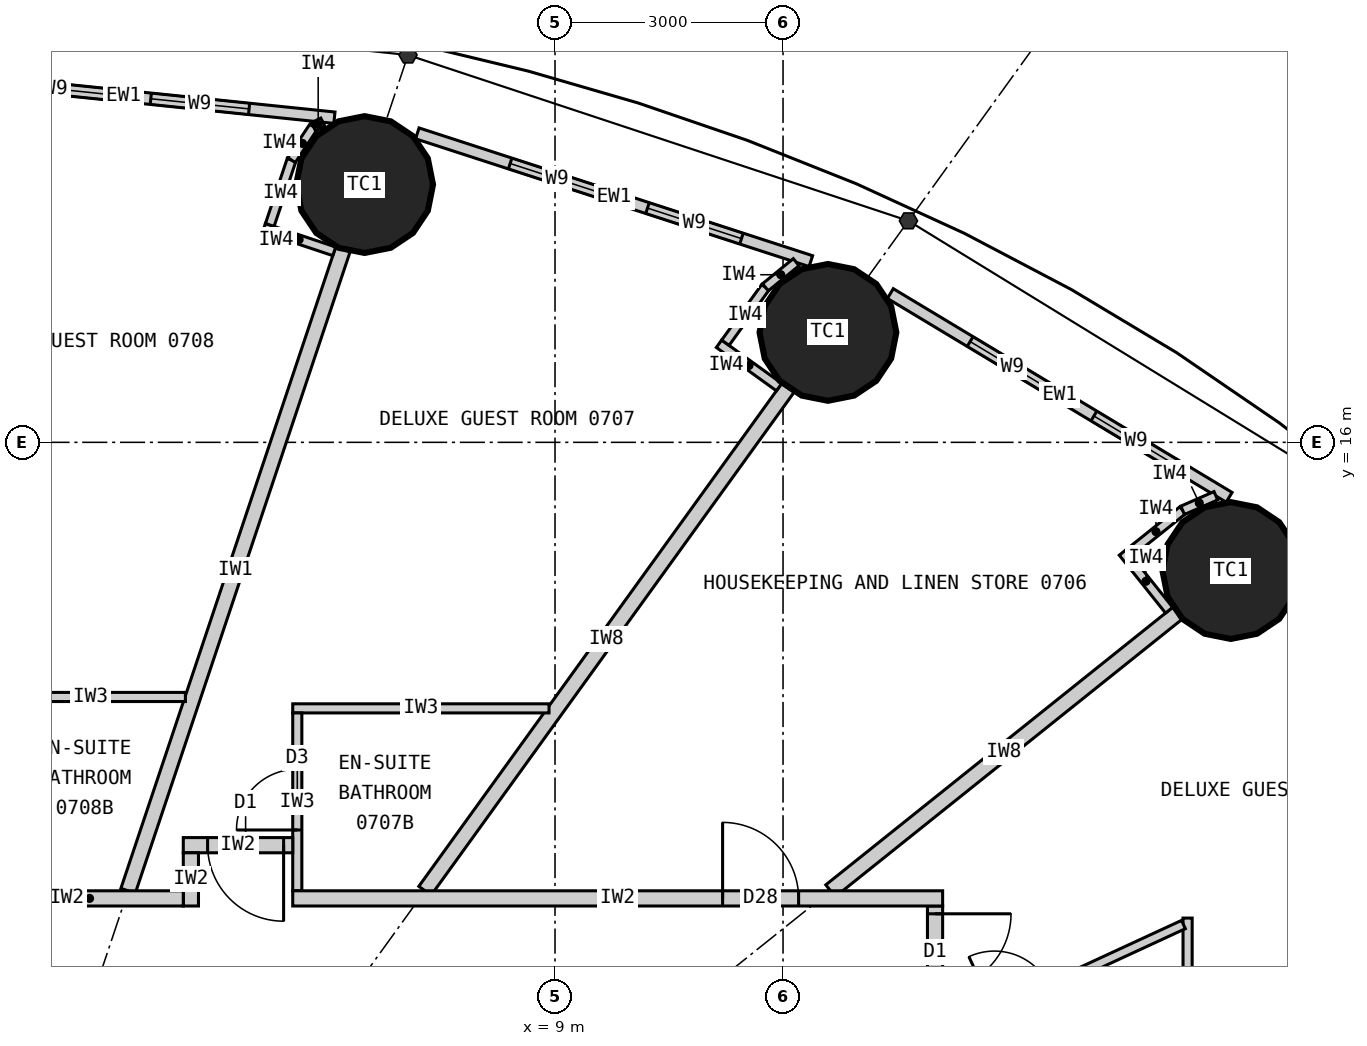
"""IFC4 building model, lengths in metres.
Left out: names, types, materials, properties, quantities, classifications, styles, units other than length and angle.
Written with IfcOpenShell. Run it as: python <this file> out.ifc"""

import sys

from ifc_helpers import new_model, si_unit, direction, frame, frame_2d, origin, origin_2d, place, context, subcontext, project, spatial, rectangle, circle, extrude, element, fill, save


model = new_model("IFC4")
c1 = context("Model", 3, precision=1e-05, world=origin(), true_north=direction((0.0, 1.0)))
c2 = subcontext(c1, "Body", "Model", "MODEL_VIEW")
j1 = project(units=[si_unit("LENGTHUNIT", "METRE"), si_unit("PLANEANGLEUNIT", "RADIAN")], contexts=[c1])
p1 = place(None, origin())
s1 = spatial("IfcSite", under=j1, at=p1, CompositionType="ELEMENT")
p2 = place(p1, origin())
s2 = spatial("IfcBuilding", under=s1, at=p2, CompositionType="ELEMENT")
p3 = place(p2, frame((0.0, 0.0, 36.0)))
s3 = spatial("IfcBuildingStorey", under=s2, at=p3, CompositionType="ELEMENT", Elevation=36.0)
for number, where, z_axis, x_axis in (
    (1, (17.892, 14.313, 0.0), (0.0, 0.0, 1.0), (1.0, 0.0, 0.0)),
    (2, (12.591, 17.447, 0.0), (0.0, 0.0, 1.0), (1.0, 0.0, 0.0)),
    (3, (6.495, 19.391, 0.0), (0.0, 0.0, 1.0), (1.0, 0.0, 0.0)),
):
    element("IfcColumn", number, at=place(p3, frame(where, z_axis=z_axis, x_axis=x_axis)), inside=s3, PredefinedType="COLUMN", context=c2, shape_type="SweptSolid", body=[
        extrude(circle(Radius=0.9, at=origin_2d()), origin(), (0.0, 0.0, 1.0), 3.3),
    ])
p4 = place(p3, frame((17.869, 15.277, 0.0), z_axis=(0.0, 0.0, 1.0), x_axis=(-0.856958191554, 0.515385931054, 0.0)))
e4 = element("IfcWall", 4, at=p4, inside=s3, PredefinedType="ELEMENTEDWALL", context=c2, shape_type="SweptSolid", body=[
    extrude(rectangle(XDim=5.201, YDim=0.15, at=frame_2d((2.601, 0.0))), origin(), (0.0, 0.0, 1.0), 3.12),
])
p5 = place(p4, frame((0.776, 0.0, 0.9)))
e5 = element("IfcOpeningElement", 5, at=p5, cuts=e4, PredefinedType="OPENING", context=c2, shape_type="SweptSolid", body=[
    extrude(rectangle(XDim=1.3, YDim=1.9, at=frame_2d((0.65, 0.95))), frame((0.0, 0.085, 0.0), z_axis=(0.0, -1.0, 0.0), x_axis=(1.0, 0.0, 0.0)), (0.0, 0.0, 1.0), 0.17),
])
p6 = place(p4, frame((2.676, 0.0, 0.9)))
e6 = element("IfcOpeningElement", 6, at=p6, cuts=e4, PredefinedType="OPENING", context=c2, shape_type="SweptSolid", body=[
    extrude(rectangle(XDim=1.3, YDim=1.9, at=frame_2d((0.65, 0.95))), frame((0.0, 0.085, 0.0), z_axis=(0.0, -1.0, 0.0), x_axis=(1.0, 0.0, 0.0)), (0.0, 0.0, 1.0), 0.17),
])
p7 = place(p3, frame((12.366, 18.384, 0.0), z_axis=(0.0, 0.0, 1.0), x_axis=(-0.951138486029, 0.308764603532, 0.0)))
e7 = element("IfcWall", 7, at=p7, inside=s3, PredefinedType="ELEMENTEDWALL", context=c2, shape_type="SweptSolid", body=[
    extrude(rectangle(XDim=5.444, YDim=0.15, at=frame_2d((2.722, 0.0))), origin(), (0.0, 0.0, 1.0), 3.12),
])
p8 = place(p7, frame((0.96, 0.0, 0.9)))
e8 = element("IfcOpeningElement", 8, at=p8, cuts=e7, PredefinedType="OPENING", context=c2, shape_type="SweptSolid", body=[
    extrude(rectangle(XDim=1.3, YDim=1.9, at=frame_2d((0.65, 0.95))), frame((0.0, 0.085, 0.0), z_axis=(0.0, -1.0, 0.0), x_axis=(1.0, 0.0, 0.0)), (0.0, 0.0, 1.0), 0.17),
])
p9 = place(p7, frame((2.86, 0.0, 0.9)))
e9 = element("IfcOpeningElement", 9, at=p9, cuts=e7, PredefinedType="OPENING", context=c2, shape_type="SweptSolid", body=[
    extrude(rectangle(XDim=1.3, YDim=1.9, at=frame_2d((0.65, 0.95))), frame((0.0, 0.085, 0.0), z_axis=(0.0, -1.0, 0.0), x_axis=(1.0, 0.0, 0.0)), (0.0, 0.0, 1.0), 0.17),
])
p10 = place(p3, frame((6.098, 20.271, 0.0), z_axis=(0.0, 0.0, 1.0), x_axis=(-0.994723735084, 0.102589915983, 0.0)))
e10 = element("IfcWall", 10, at=p10, inside=s3, PredefinedType="ELEMENTEDWALL", context=c2, shape_type="SweptSolid", body=[
    extrude(rectangle(XDim=5.576, YDim=0.15, at=frame_2d((2.788, 0.0))), origin(), (0.0, 0.0, 1.0), 3.12),
])
p11 = place(p10, frame((1.129, 0.0, 0.9)))
e11 = element("IfcOpeningElement", 11, at=p11, cuts=e10, PredefinedType="OPENING", context=c2, shape_type="SweptSolid", body=[
    extrude(rectangle(XDim=1.3, YDim=1.9, at=frame_2d((0.65, 0.95))), frame((0.0, 0.085, 0.0), z_axis=(0.0, -1.0, 0.0), x_axis=(1.0, 0.0, 0.0)), (0.0, 0.0, 1.0), 0.17),
])
p12 = place(p10, frame((3.029, 0.0, 0.9)))
e12 = element("IfcOpeningElement", 12, at=p12, cuts=e10, PredefinedType="OPENING", context=c2, shape_type="SweptSolid", body=[
    extrude(rectangle(XDim=1.3, YDim=1.9, at=frame_2d((0.65, 0.95))), frame((0.0, 0.085, 0.0), z_axis=(0.0, -1.0, 0.0), x_axis=(1.0, 0.0, 0.0)), (0.0, 0.0, 1.0), 0.17),
])
p13 = place(p3, frame((14.1, 6.512, 0.0), z_axis=(0.0, 0.0, 1.0), x_axis=(0.907842433118, 0.41931147925, 0.0)))
e13 = element("IfcWall", 13, at=p13, inside=s3, PredefinedType="PARTITIONING", context=c2, shape_type="SweptSolid", body=[
    extrude(rectangle(XDim=7.823, YDim=0.2, at=frame_2d((3.912, 0.0))), origin(), (0.0, 0.0, 1.0), 2.32),
])
p14 = place(p3, frame((12.625, 10.1, 0.0), z_axis=(0.0, 0.0, 1.0), x_axis=(0.780872884676, 0.624689953479, 0.0)))
e14 = element("IfcWall", 14, at=p14, inside=s3, PredefinedType="PARTITIONING", context=c2, shape_type="SweptSolid", body=[
    extrude(rectangle(XDim=5.845, YDim=0.2, at=frame_2d((2.922, 0.0))), origin(), (0.0, 0.0, 1.0), 2.32),
])
p15 = place(p3, frame((7.289, 10.1, 0.0), z_axis=(0.0, 0.0, 1.0), x_axis=(0.585216319319, 0.810877216108, 0.0)))
e15 = element("IfcWall", 15, at=p15, inside=s3, PredefinedType="PARTITIONING", context=c2, shape_type="SweptSolid", body=[
    extrude(rectangle(XDim=8.16, YDim=0.2, at=frame_2d((4.08, 0.0))), origin(), (0.0, 0.0, 1.0), 2.32),
])
p16 = place(p3, frame((3.383, 10.1, 0.0), z_axis=(0.0, 0.0, 1.0), x_axis=(0.317593727596, 0.948226884344, 0.0)))
e16 = element("IfcWall", 16, at=p16, inside=s3, PredefinedType="PARTITIONING", context=c2, shape_type="SweptSolid", body=[
    extrude(rectangle(XDim=8.899, YDim=0.2, at=frame_2d((4.449, 0.0))), origin(), (0.0, 0.0, 1.0), 2.32),
])
p17 = place(p3, frame((17.323, 8.101, 0.0), z_axis=(0.0, 0.0, 1.0), x_axis=(0.0, 1.0, 0.0)))
e17 = element("IfcWall", 17, at=p17, inside=s3, PredefinedType="PARTITIONING", context=c2, shape_type="SweptSolid", body=[
    extrude(rectangle(XDim=1.64, YDim=0.12, at=frame_2d((0.82, 0.0))), origin(), (0.0, 0.0, 1.0), 3.12),
])
p18 = place(p3, frame((14.1, 8.193, 0.0), z_axis=(0.0, 0.0, 1.0), x_axis=(0.907836493557, 0.419324338628, 0.0)))
e18 = element("IfcWall", 18, at=p18, inside=s3, PredefinedType="PARTITIONING", context=c2, shape_type="SweptSolid", body=[
    extrude(rectangle(XDim=3.49, YDim=0.12, at=frame_2d((1.745, 0.0))), origin(), (0.0, 0.0, 1.0), 3.12),
])
p19 = place(p18, frame((0.75, 0.0, 0.0)))
e19 = element("IfcOpeningElement", 19, at=p19, cuts=e18, PredefinedType="OPENING", context=c2, shape_type="SweptSolid", body=[
    extrude(rectangle(XDim=0.8, YDim=2.1, at=frame_2d((0.4, 1.05))), frame((0.0, 0.07, 0.0), z_axis=(0.0, -1.0, 0.0), x_axis=(1.0, 0.0, 0.0)), (0.0, 0.0, 1.0), 0.14),
])
p20 = place(p3, frame((8.921, 12.5, 0.0), z_axis=(0.0, 0.0, 1.0), x_axis=(-1.0, 0.0, 0.0)))
e20 = element("IfcWall", 20, at=p20, inside=s3, PredefinedType="PARTITIONING", context=c2, shape_type="SweptSolid", body=[
    extrude(rectangle(XDim=3.372, YDim=0.12, at=frame_2d((1.686, 0.0))), origin(), (0.0, 0.0, 1.0), 3.12),
])
p21 = place(p3, frame((5.609, 10.1, 0.0), z_axis=(0.0, 0.0, 1.0), x_axis=(0.0, 1.0, 0.0)))
e21 = element("IfcWall", 21, at=p21, inside=s3, PredefinedType="PARTITIONING", context=c2, shape_type="SweptSolid", body=[
    extrude(rectangle(XDim=2.34, YDim=0.12, at=frame_2d((1.17, 0.0))), origin(), (0.0, 0.0, 1.0), 3.12),
])
p22 = place(p21, frame((0.8, 0.0, 0.0)))
e22 = element("IfcOpeningElement", 22, at=p22, cuts=e21, PredefinedType="OPENING", context=c2, shape_type="SweptSolid", body=[
    extrude(rectangle(XDim=0.8, YDim=2.1, at=frame_2d((0.4, 1.05))), frame((0.0, 0.07, 0.0), z_axis=(0.0, -1.0, 0.0), x_axis=(1.0, 0.0, 0.0)), (0.0, 0.0, 1.0), 0.14),
])
p23 = place(p3, frame((4.137, 12.65, 0.0), z_axis=(0.0, 0.0, 1.0), x_axis=(-1.0, 0.0, 0.0)))
e23 = element("IfcWall", 23, at=p23, inside=s3, PredefinedType="PARTITIONING", context=c2, shape_type="SweptSolid", body=[
    extrude(rectangle(XDim=2.494, YDim=0.12, at=frame_2d((1.247, 0.0))), origin(), (0.0, 0.0, 1.0), 3.12),
])
p24 = place(p3, frame((4.109, 10.7, 0.0), z_axis=(0.0, 0.0, 1.0), x_axis=(1.0, 0.0, 0.0)))
e24 = element("IfcWall", 24, at=p24, inside=s3, PredefinedType="PARTITIONING", context=c2, shape_type="SweptSolid", body=[
    extrude(rectangle(XDim=1.44, YDim=0.2, at=frame_2d((0.72, 0.0))), origin(), (0.0, 0.0, 1.0), 3.12),
])
p25 = place(p24, frame((0.32, 0.0, 0.0)))
e25 = element("IfcOpeningElement", 25, at=p25, cuts=e24, PredefinedType="OPENING", context=c2, shape_type="SweptSolid", body=[
    extrude(rectangle(XDim=1.0, YDim=2.2, at=frame_2d((0.5, 1.1))), frame((0.0, 0.11, 0.0), z_axis=(0.0, -1.0, 0.0), x_axis=(1.0, 0.0, 0.0)), (0.0, 0.0, 1.0), 0.22),
])
p26 = place(p3, frame((4.209, 9.9, 0.0), z_axis=(0.0, 0.0, 1.0), x_axis=(0.0, 1.0, 0.0)))
e26 = element("IfcWall", 26, at=p26, inside=s3, PredefinedType="PARTITIONING", context=c2, shape_type="SweptSolid", body=[
    extrude(rectangle(XDim=0.7, YDim=0.2, at=frame_2d((0.35, 0.0))), origin(), (0.0, 0.0, 1.0), 3.12),
])
p27 = place(p3, frame((14.0, 4.772, 0.0), z_axis=(0.0, 0.0, 1.0), x_axis=(0.0, 1.0, 0.0)))
e27 = element("IfcWall", 27, at=p27, inside=s3, PredefinedType="PARTITIONING", context=c2, shape_type="SweptSolid", body=[
    extrude(rectangle(XDim=5.127, YDim=0.2, at=frame_2d((2.564, 0.0))), origin(), (0.0, 0.0, 1.0), 3.12),
])
p28 = place(p27, frame((4.025, 0.0, 0.0)))
e28 = element("IfcOpeningElement", 28, at=p28, cuts=e27, PredefinedType="OPENING", context=c2, shape_type="SweptSolid", body=[
    extrude(rectangle(XDim=1.0, YDim=2.2, at=frame_2d((0.5, 1.1))), frame((0.0, 0.11, 0.0), z_axis=(0.0, -1.0, 0.0), x_axis=(1.0, 0.0, 0.0)), (0.0, 0.0, 1.0), 0.22),
])
p29 = place(p3, frame((1.643, 10.0, 0.0), z_axis=(0.0, 0.0, 1.0), x_axis=(1.0, 0.0, 0.0)))
e29 = element("IfcWall", 29, at=p29, inside=s3, PredefinedType="PARTITIONING", context=c2, shape_type="SweptSolid", body=[
    extrude(rectangle(XDim=2.466, YDim=0.2, at=frame_2d((1.233, 0.0))), origin(), (0.0, 0.0, 1.0), 3.12),
])
p30 = place(p3, frame((5.549, 10.0, 0.0), z_axis=(0.0, 0.0, 1.0), x_axis=(1.0, 0.0, 0.0)))
e30 = element("IfcWall", 30, at=p30, inside=s3, PredefinedType="PARTITIONING", context=c2, shape_type="SweptSolid", body=[
    extrude(rectangle(XDim=8.551, YDim=0.2, at=frame_2d((4.275, 0.0))), origin(), (0.0, 0.0, 1.0), 3.12),
])
p31 = place(p30, frame((5.656, 0.0, 0.0)))
e31 = element("IfcOpeningElement", 31, at=p31, cuts=e30, PredefinedType="OPENING", context=c2, shape_type="SweptSolid", body=[
    extrude(rectangle(XDim=1.0, YDim=2.2, at=frame_2d((0.5, 1.1))), frame((0.0, 0.11, 0.0), z_axis=(0.0, -1.0, 0.0), x_axis=(1.0, 0.0, 0.0)), (0.0, 0.0, 1.0), 0.22),
])
p32 = place(p3, frame((17.08, 13.792, 0.0), z_axis=(0.0, 0.0, 1.0), x_axis=(-0.624756144097, 0.780819928289, 0.0)))
e32 = element("IfcWall", 32, at=p32, inside=s3, PredefinedType="PARTITIONING", context=c2, shape_type="SweptSolid", body=[
    extrude(rectangle(XDim=0.975, YDim=0.12, at=frame_2d((0.487, 0.0))), origin(), (0.0, 0.0, 1.0), 3.12),
])
p33 = place(p3, frame((16.555, 14.543, 0.0), z_axis=(0.0, 0.0, 1.0), x_axis=(0.780789399477, 0.62479429708, 0.0)))
e33 = element("IfcWall", 33, at=p33, inside=s3, PredefinedType="PARTITIONING", context=c2, shape_type="SweptSolid", body=[
    extrude(rectangle(XDim=0.9, YDim=0.12, at=frame_2d((0.45, 0.0))), origin(), (0.0, 0.0, 1.0), 3.12),
])
p34 = place(p3, frame((17.258, 15.106, 0.0), z_axis=(0.0, 0.0, 1.0), x_axis=(0.916098562583, 0.400953143937, 0.0)))
e34 = element("IfcWall", 34, at=p34, inside=s3, PredefinedType="PARTITIONING", context=c2, shape_type="SweptSolid", body=[
    extrude(rectangle(XDim=0.477, YDim=0.12, at=frame_2d((0.238, 0.0))), origin(), (0.0, 0.0, 1.0), 3.12),
])
p35 = place(p3, frame((11.948, 16.727, 0.0), z_axis=(0.0, 0.0, 1.0), x_axis=(-0.810897160646, 0.585188683123, 0.0)))
e35 = element("IfcWall", 35, at=p35, inside=s3, PredefinedType="PARTITIONING", context=c2, shape_type="SweptSolid", body=[
    extrude(rectangle(XDim=0.975, YDim=0.12, at=frame_2d((0.487, 0.0))), origin(), (0.0, 0.0, 1.0), 3.12),
])
p36 = place(p3, frame((11.241, 17.31, 0.0), z_axis=(0.0, 0.0, 1.0), x_axis=(0.585054732094, 0.810993810367, 0.0)))
e36 = element("IfcWall", 36, at=p36, inside=s3, PredefinedType="PARTITIONING", context=c2, shape_type="SweptSolid", body=[
    extrude(rectangle(XDim=0.9, YDim=0.12, at=frame_2d((0.45, 0.0))), origin(), (0.0, 0.0, 1.0), 3.12),
])
p37 = place(p3, frame((11.768, 18.04, 0.0), z_axis=(0.0, 0.0, 1.0), x_axis=(0.775268927517, 0.631631292787, 0.0)))
e37 = element("IfcWall", 37, at=p37, inside=s3, PredefinedType="PARTITIONING", context=c2, shape_type="SweptSolid", body=[
    extrude(rectangle(XDim=0.522, YDim=0.12, at=frame_2d((0.261, 0.0))), origin(), (0.0, 0.0, 1.0), 3.12),
])
p38 = place(p3, frame((6.095, 18.513, 0.0), z_axis=(0.0, 0.0, 1.0), x_axis=(-0.948281677008, 0.317430088446, 0.0)))
e38 = element("IfcWall", 38, at=p38, inside=s3, PredefinedType="PARTITIONING", context=c2, shape_type="SweptSolid", body=[
    extrude(rectangle(XDim=0.974, YDim=0.12, at=frame_2d((0.487, 0.0))), origin(), (0.0, 0.0, 1.0), 3.12),
])
p39 = place(p3, frame((5.247, 18.86, 0.0), z_axis=(0.0, 0.0, 1.0), x_axis=(0.317610704489, 0.94822119803, 0.0)))
e39 = element("IfcWall", 39, at=p39, inside=s3, PredefinedType="PARTITIONING", context=c2, shape_type="SweptSolid", body=[
    extrude(rectangle(XDim=0.9, YDim=0.12, at=frame_2d((0.45, 0.0))), origin(), (0.0, 0.0, 1.0), 3.12),
])
p40 = place(p3, frame((5.533, 19.714, 0.0), z_axis=(0.0, 0.0, 1.0), x_axis=(0.552014331743, 0.833834622422, 0.0)))
e40 = element("IfcWall", 40, at=p40, inside=s3, PredefinedType="PARTITIONING", context=c2, shape_type="SweptSolid", body=[
    extrude(rectangle(XDim=0.525, YDim=0.12, at=frame_2d((0.262, 0.0))), origin(), (0.0, 0.0, 1.0), 3.12),
])
p41 = place(p3, frame((5.823, 20.151, 0.0), z_axis=(0.0, 0.0, 1.0), x_axis=(0.894784104941, 0.446499054362, 0.0)))
e41 = element("IfcWall", 41, at=p41, inside=s3, PredefinedType="PARTITIONING", context=c2, shape_type="SweptSolid", body=[
    extrude(rectangle(XDim=0.137, YDim=0.12, at=frame_2d((0.068, 0.0))), origin(), (0.0, 0.0, 1.0), 3.12),
])
p42 = place(p5, origin())
e42 = element("IfcWindow", 42, at=p42, inside=s3, PartitioningType="SINGLE_PANEL", PredefinedType="WINDOW", context=c2, shape_type="SweptSolid", body=[
    extrude(rectangle(XDim=1.3, YDim=1.9, at=frame_2d((0.65, 0.95))), frame((0.0, 0.03, 0.0), z_axis=(0.0, -1.0, 0.0), x_axis=(1.0, 0.0, 0.0)), (0.0, 0.0, 1.0), 0.06),
])
fill(e5, e42)
p43 = place(p6, origin())
e43 = element("IfcWindow", 43, at=p43, inside=s3, PartitioningType="SINGLE_PANEL", PredefinedType="WINDOW", context=c2, shape_type="SweptSolid", body=[
    extrude(rectangle(XDim=1.3, YDim=1.9, at=frame_2d((0.65, 0.95))), frame((0.0, 0.03, 0.0), z_axis=(0.0, -1.0, 0.0), x_axis=(1.0, 0.0, 0.0)), (0.0, 0.0, 1.0), 0.06),
])
fill(e6, e43)
p44 = place(p8, origin())
e44 = element("IfcWindow", 44, at=p44, inside=s3, PartitioningType="SINGLE_PANEL", PredefinedType="WINDOW", context=c2, shape_type="SweptSolid", body=[
    extrude(rectangle(XDim=1.3, YDim=1.9, at=frame_2d((0.65, 0.95))), frame((0.0, 0.03, 0.0), z_axis=(0.0, -1.0, 0.0), x_axis=(1.0, 0.0, 0.0)), (0.0, 0.0, 1.0), 0.06),
])
fill(e8, e44)
p45 = place(p9, origin())
e45 = element("IfcWindow", 45, at=p45, inside=s3, PartitioningType="SINGLE_PANEL", PredefinedType="WINDOW", context=c2, shape_type="SweptSolid", body=[
    extrude(rectangle(XDim=1.3, YDim=1.9, at=frame_2d((0.65, 0.95))), frame((0.0, 0.03, 0.0), z_axis=(0.0, -1.0, 0.0), x_axis=(1.0, 0.0, 0.0)), (0.0, 0.0, 1.0), 0.06),
])
fill(e9, e45)
p46 = place(p11, origin())
e46 = element("IfcWindow", 46, at=p46, inside=s3, PartitioningType="SINGLE_PANEL", PredefinedType="WINDOW", context=c2, shape_type="SweptSolid", body=[
    extrude(rectangle(XDim=1.3, YDim=1.9, at=frame_2d((0.65, 0.95))), frame((0.0, 0.03, 0.0), z_axis=(0.0, -1.0, 0.0), x_axis=(1.0, 0.0, 0.0)), (0.0, 0.0, 1.0), 0.06),
])
fill(e11, e46)
p47 = place(p12, origin())
e47 = element("IfcWindow", 47, at=p47, inside=s3, PartitioningType="SINGLE_PANEL", PredefinedType="WINDOW", context=c2, shape_type="SweptSolid", body=[
    extrude(rectangle(XDim=1.3, YDim=1.9, at=frame_2d((0.65, 0.95))), frame((0.0, 0.03, 0.0), z_axis=(0.0, -1.0, 0.0), x_axis=(1.0, 0.0, 0.0)), (0.0, 0.0, 1.0), 0.06),
])
fill(e12, e47)
p48 = place(p28, origin())
e48 = element("IfcDoor", 48, at=p48, inside=s3, OperationType="SINGLE_SWING_RIGHT", PredefinedType="DOOR", context=c2, shape_type="SweptSolid", body=[
    extrude(rectangle(XDim=1.0, YDim=2.2, at=frame_2d((0.5, 1.1))), frame((0.0, 0.025, 0.0), z_axis=(0.0, -1.0, 0.0), x_axis=(1.0, 0.0, 0.0)), (0.0, 0.0, 1.0), 0.05),
])
fill(e28, e48)
p49 = place(p31, origin())
e49 = element("IfcDoor", 49, at=p49, inside=s3, OperationType="SINGLE_SWING_LEFT", PredefinedType="DOOR", context=c2, shape_type="SweptSolid", body=[
    extrude(rectangle(XDim=1.0, YDim=2.2, at=frame_2d((0.5, 1.1))), frame((0.0, 0.025, 0.0), z_axis=(0.0, -1.0, 0.0), x_axis=(1.0, 0.0, 0.0)), (0.0, 0.0, 1.0), 0.05),
])
fill(e31, e49)
p50 = place(p22, origin())
e50 = element("IfcDoor", 50, at=p50, inside=s3, OperationType="SINGLE_SWING_LEFT", PredefinedType="DOOR", context=c2, shape_type="SweptSolid", body=[
    extrude(rectangle(XDim=0.8, YDim=2.1, at=frame_2d((0.4, 1.05))), frame((0.0, 0.025, 0.0), z_axis=(0.0, -1.0, 0.0), x_axis=(1.0, 0.0, 0.0)), (0.0, 0.0, 1.0), 0.05),
])
fill(e22, e50)
p51 = place(p25, origin())
e51 = element("IfcDoor", 51, at=p51, inside=s3, OperationType="SINGLE_SWING_RIGHT", PredefinedType="DOOR", context=c2, shape_type="SweptSolid", body=[
    extrude(rectangle(XDim=1.0, YDim=2.2, at=frame_2d((0.5, 1.1))), frame((0.0, 0.025, 0.0), z_axis=(0.0, -1.0, 0.0), x_axis=(1.0, 0.0, 0.0)), (0.0, 0.0, 1.0), 0.05),
])
fill(e25, e51)
save(model, sys.argv[1])
